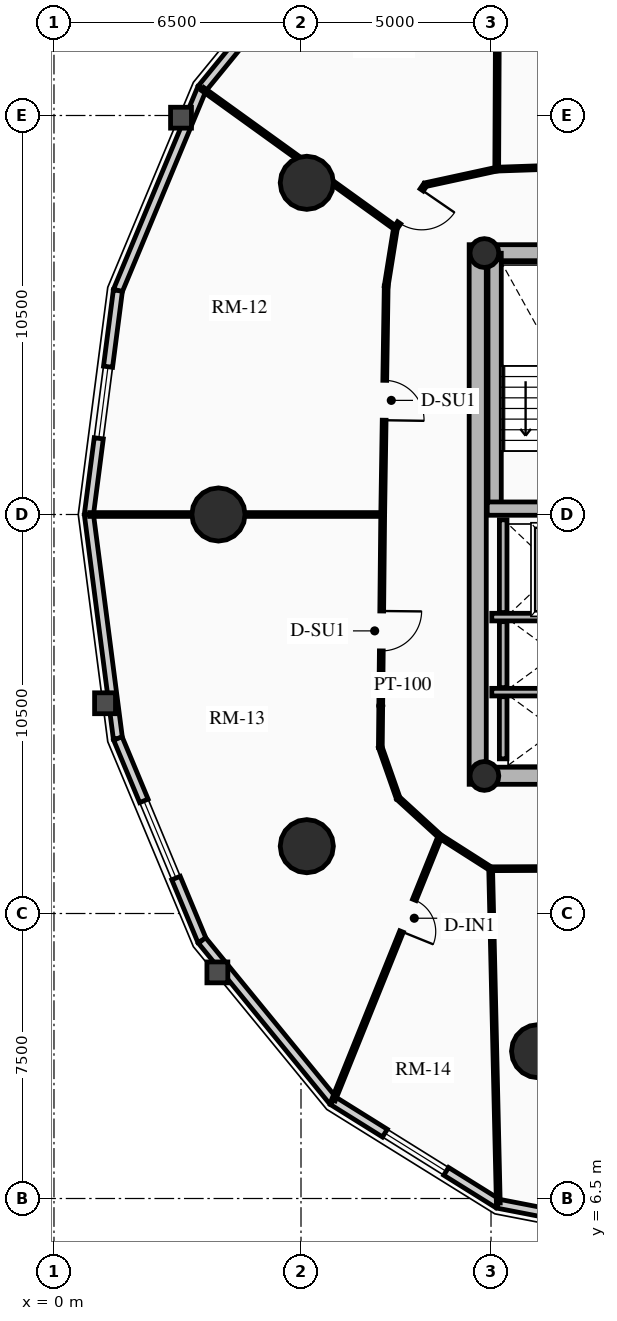
"""IFC4 building model, lengths in metres.
Left out: names, types, materials, properties, quantities, classifications, styles, units other than length and angle.
Written with IfcOpenShell. Run it as: python <this file> out.ifc"""

import sys

from ifc_helpers import new_model, si_unit, direction, frame, frame_2d, origin, origin_2d, place, context, subcontext, project, spatial, rectangle, circle, hollow_circle, extrude, source, transform, mapped, element, fill, save


model = new_model("IFC4")
c1 = context("Model", 3, precision=1e-05, world=origin(), true_north=direction((0.0, 1.0)))
c2 = subcontext(c1, "Body", "Model", "MODEL_VIEW")
j1 = project(units=[si_unit("LENGTHUNIT", "METRE"), si_unit("PLANEANGLEUNIT", "RADIAN")], contexts=[c1])
p1 = place(None, origin())
s1 = spatial("IfcSite", under=j1, at=p1, CompositionType="ELEMENT")
p2 = place(p1, origin())
s2 = spatial("IfcBuilding", under=s1, at=p2, CompositionType="ELEMENT")
p3 = place(p2, frame((0.0, 0.0, 99.25)))
s3 = spatial("IfcBuildingStorey", under=s2, at=p3, CompositionType="ELEMENT", Elevation=99.25)
p4 = place(p3, frame((11.15, 17.4, 0.0), z_axis=(0.0, 0.0, 1.0), x_axis=(0.0, 1.0, 0.0)))
e1 = element("IfcWall", 1, at=p4, inside=s3, PredefinedType="SHEAR", context=c2, shape_type="SweptSolid", body=[
    extrude(rectangle(XDim=14.2, YDim=0.45, at=frame_2d((7.1, 0.0))), origin(), (0.0, 0.0, 1.0), 2.91),
])
p5 = place(p3, frame((11.15, 17.625, 0.0), z_axis=(0.0, 0.0, 1.0), x_axis=(1.0, 0.0, 0.0)))
e2 = element("IfcWall", 2, at=p5, inside=s3, PredefinedType="SHEAR", context=c2, shape_type="SweptSolid", body=[
    extrude(rectangle(XDim=10.7, YDim=0.45, at=frame_2d((5.35, 0.0))), origin(), (0.0, 0.0, 1.0), 2.91),
])
m1 = source(origin(), c2, "Body", "SweptSolid", [
    extrude(rectangle(XDim=1.5, YDim=2.02, at=frame_2d((0.75, 1.01))), frame((0.0, 0.235, 0.0), z_axis=(0.0, -1.0, 0.0), x_axis=(1.0, 0.0, 0.0)), (0.0, 0.0, 1.0), 0.47),
])
p6 = place(p5, frame((5.45, 0.0, 0.0)))
e3 = element("IfcOpeningElement", 3, at=p6, cuts=e2, PredefinedType="OPENING", context=c2, shape_type="MappedRepresentation", body=[
    mapped(m1, transform((0.0, 0.0, 0.0), x_axis=(1.0, 0.0, 0.0), y_axis=(0.0, 1.0, 0.0), z_axis=(0.0, 0.0, 1.0), scale=1.0)),
])
p7 = place(p3, frame((11.15, 31.375, 0.0), z_axis=(0.0, 0.0, 1.0), x_axis=(1.0, 0.0, 0.0)))
e4 = element("IfcWall", 4, at=p7, inside=s3, PredefinedType="SHEAR", context=c2, shape_type="SweptSolid", body=[
    extrude(rectangle(XDim=10.7, YDim=0.45, at=frame_2d((5.35, 0.0))), origin(), (0.0, 0.0, 1.0), 2.91),
])
p8 = place(p7, frame((4.6, 0.0, 0.0)))
e5 = element("IfcOpeningElement", 5, at=p8, cuts=e4, PredefinedType="OPENING", context=c2, shape_type="MappedRepresentation", body=[
    mapped(m1, transform((0.0, 0.0, 0.0), x_axis=(1.0, 0.0, 0.0), y_axis=(0.0, 1.0, 0.0), z_axis=(0.0, 0.0, 1.0), scale=1.0)),
])
p9 = place(p3, frame((11.595, 24.655, 0.0), z_axis=(0.0, 0.0, 1.0), x_axis=(0.0, 1.0, 0.0)))
e6 = element("IfcWall", 6, at=p9, inside=s3, PredefinedType="SHEAR", context=c2, shape_type="SweptSolid", body=[
    extrude(rectangle(XDim=6.72, YDim=0.35, at=frame_2d((3.36, 0.0))), origin(), (0.0, 0.0, 1.0), 2.91),
])
p10 = place(p3, frame((11.4, 24.655, 0.0), z_axis=(0.0, 0.0, 1.0), x_axis=(1.0, 0.0, 0.0)))
e7 = element("IfcWall", 7, at=p10, inside=s3, PredefinedType="SHEAR", context=c2, shape_type="SweptSolid", body=[
    extrude(rectangle(XDim=3.285, YDim=0.35, at=frame_2d((1.643, 0.0))), origin(), (0.0, 0.0, 1.0), 2.91),
])
for number, where, z_axis, x_axis in (
    (8, (11.325, 17.62, 0.0), (0.0, 0.0, 1.0), (1.0, 0.0, 0.0)),
    (9, (11.325, 31.38, 0.0), (0.0, 0.0, 1.0), (1.0, 0.0, 0.0)),
):
    element("IfcColumn", number, at=place(p3, frame(where, z_axis=z_axis, x_axis=x_axis)), inside=s3, PredefinedType="COLUMN", context=c2, shape_type="SweptSolid", body=[
        extrude(hollow_circle(Radius=0.38, WallThickness=0.032, at=origin_2d()), origin(), (0.0, 0.0, 1.0), 2.91),
    ])
for number, where, z_axis, x_axis in (
    (10, (6.653, 33.229, 0.0), (0.0, 0.0, 1.0), (1.0, 0.0, 0.0)),
    (11, (4.328, 24.5, 0.0), (0.0, 0.0, 1.0), (1.0, 0.0, 0.0)),
    (12, (6.653, 15.771, 0.0), (0.0, 0.0, 1.0), (1.0, 0.0, 0.0)),
    (13, (12.739, 10.377, 0.0), (0.0, 0.0, 1.0), (1.0, 0.0, 0.0)),
):
    element("IfcColumn", number, at=place(p3, frame(where, z_axis=z_axis, x_axis=x_axis)), inside=s3, PredefinedType="USERDEFINED", context=c2, shape_type="SweptSolid", body=[
        extrude(circle(Radius=0.7, at=origin_2d()), origin(), (0.0, 0.0, 1.0), 2.91),
    ])
p11 = place(p3, frame((3.895, 35.709, 0.0), z_axis=(0.0, 0.0, 1.0), x_axis=(0.632700781152, 0.77439635945, 0.0)))
e14 = element("IfcWall", 14, at=p11, inside=s3, PredefinedType="SOLIDWALL", context=c2, shape_type="SweptSolid", body=[
    extrude(rectangle(XDim=5.448, YDim=0.24, at=frame_2d((2.724, 0.0))), origin(), (0.0, 0.0, 1.0), 2.179),
])
m2 = source(origin(), c2, "Body", "SweptSolid", [
    extrude(rectangle(XDim=1.9, YDim=1.35, at=frame_2d((0.95, 0.675))), frame((0.0, 0.13, 0.0), z_axis=(0.0, -1.0, 0.0), x_axis=(1.0, 0.0, 0.0)), (0.0, 0.0, 1.0), 0.26),
])
p12 = place(p11, frame((1.774, 0.0, 0.65)))
e15 = element("IfcOpeningElement", 15, at=p12, cuts=e14, PredefinedType="OPENING", context=c2, shape_type="MappedRepresentation", body=[
    mapped(m2, transform((0.0, 0.0, 0.0), x_axis=(1.0, 0.0, 0.0), y_axis=(0.0, 1.0, 0.0), z_axis=(0.0, 0.0, 1.0), scale=1.0)),
])
p13 = place(p3, frame((1.682, 30.393, 0.0), z_axis=(0.0, 0.0, 1.0), x_axis=(0.384344417632, 0.923189779317, 0.0)))
e16 = element("IfcWall", 16, at=p13, inside=s3, PredefinedType="SOLIDWALL", context=c2, shape_type="SweptSolid", body=[
    extrude(rectangle(XDim=5.758, YDim=0.24, at=frame_2d((2.879, 0.0))), origin(), (0.0, 0.0, 1.0), 2.179),
])
p14 = place(p3, frame((0.919, 24.5, 0.0), z_axis=(0.0, 0.0, 1.0), x_axis=(0.128351991996, 0.991728675672, 0.0)))
e17 = element("IfcWall", 17, at=p14, inside=s3, PredefinedType="SOLIDWALL", context=c2, shape_type="SweptSolid", body=[
    extrude(rectangle(XDim=5.942, YDim=0.24, at=frame_2d((2.971, 0.0))), origin(), (0.0, 0.0, 1.0), 2.179),
])
p15 = place(p14, frame((2.021, 0.0, 0.65)))
e18 = element("IfcOpeningElement", 18, at=p15, cuts=e17, PredefinedType="OPENING", context=c2, shape_type="MappedRepresentation", body=[
    mapped(m2, transform((0.0, 0.0, 0.0), x_axis=(1.0, 0.0, 0.0), y_axis=(0.0, 1.0, 0.0), z_axis=(0.0, 0.0, 1.0), scale=1.0)),
])
p16 = place(p3, frame((1.682, 18.607, 0.0), z_axis=(0.0, 0.0, 1.0), x_axis=(-0.128351991996, 0.991728675672, 0.0)))
e19 = element("IfcWall", 19, at=p16, inside=s3, PredefinedType="SOLIDWALL", context=c2, shape_type="SweptSolid", body=[
    extrude(rectangle(XDim=5.942, YDim=0.24, at=frame_2d((2.971, 0.0))), origin(), (0.0, 0.0, 1.0), 2.179),
])
p17 = place(p3, frame((3.895, 13.291, 0.0), z_axis=(0.0, 0.0, 1.0), x_axis=(-0.384344417632, 0.923189779317, 0.0)))
e20 = element("IfcWall", 20, at=p17, inside=s3, PredefinedType="SOLIDWALL", context=c2, shape_type="SweptSolid", body=[
    extrude(rectangle(XDim=5.758, YDim=0.24, at=frame_2d((2.879, 0.0))), origin(), (0.0, 0.0, 1.0), 2.179),
])
m3 = source(origin(), c2, "Body", "SweptSolid", [
    extrude(rectangle(XDim=2.2, YDim=1.35, at=frame_2d((1.1, 0.675))), frame((0.0, 0.13, 0.0), z_axis=(0.0, -1.0, 0.0), x_axis=(1.0, 0.0, 0.0)), (0.0, 0.0, 1.0), 0.26),
])
p18 = place(p17, frame((1.779, 0.0, 0.65)))
e21 = element("IfcOpeningElement", 21, at=p18, cuts=e20, PredefinedType="OPENING", context=c2, shape_type="MappedRepresentation", body=[
    mapped(m3, transform((0.0, 0.0, 0.0), x_axis=(1.0, 0.0, 0.0), y_axis=(0.0, 1.0, 0.0), z_axis=(0.0, 0.0, 1.0), scale=1.0)),
])
p19 = place(p3, frame((7.342, 9.072, 0.0), z_axis=(0.0, 0.0, 1.0), x_axis=(-0.632700781152, 0.77439635945, 0.0)))
e22 = element("IfcWall", 22, at=p19, inside=s3, PredefinedType="SOLIDWALL", context=c2, shape_type="SweptSolid", body=[
    extrude(rectangle(XDim=5.448, YDim=0.24, at=frame_2d((2.724, 0.0))), origin(), (0.0, 0.0, 1.0), 2.179),
])
p20 = place(p3, frame((11.685, 6.363, 0.0), z_axis=(0.0, 0.0, 1.0), x_axis=(-0.848520380187, 0.529162701263, 0.0)))
e23 = element("IfcWall", 23, at=p20, inside=s3, PredefinedType="SOLIDWALL", context=c2, shape_type="SweptSolid", body=[
    extrude(rectangle(XDim=5.119, YDim=0.24, at=frame_2d((2.56, 0.0))), origin(), (0.0, 0.0, 1.0), 2.179),
])
p21 = place(p20, frame((1.609, 0.0, 0.65)))
e24 = element("IfcOpeningElement", 24, at=p21, cuts=e23, PredefinedType="OPENING", context=c2, shape_type="MappedRepresentation", body=[
    mapped(m2, transform((0.0, 0.0, 0.0), x_axis=(1.0, 0.0, 0.0), y_axis=(0.0, 1.0, 0.0), z_axis=(0.0, 0.0, 1.0), scale=1.0)),
])
p22 = place(p3, frame((16.5, 5.43, 0.0), z_axis=(0.0, 0.0, 1.0), x_axis=(-0.981723785992, 0.190311344954, 0.0)))
e25 = element("IfcWall", 25, at=p22, inside=s3, PredefinedType="SOLIDWALL", context=c2, shape_type="SweptSolid", body=[
    extrude(rectangle(XDim=4.904, YDim=0.24, at=frame_2d((2.452, 0.0))), origin(), (0.0, 0.0, 1.0), 2.179),
])
p23 = place(p22, frame((1.352, 0.0, 0.65)))
e26 = element("IfcOpeningElement", 26, at=p23, cuts=e25, PredefinedType="OPENING", context=c2, shape_type="MappedRepresentation", body=[
    mapped(m3, transform((0.0, 0.0, 0.0), x_axis=(1.0, 0.0, 0.0), y_axis=(0.0, 1.0, 0.0), z_axis=(0.0, 0.0, 1.0), scale=1.0)),
])
p24 = place(p3, frame((11.52, 21.8, 0.0), z_axis=(0.0, 0.0, 1.0), x_axis=(1.0, 0.0, 0.0)))
e27 = element("IfcWall", 27, at=p24, inside=s3, PredefinedType="SHEAR", context=c2, shape_type="SweptSolid", body=[
    extrude(rectangle(XDim=2.97, YDim=0.2, at=frame_2d((1.485, 0.0))), origin(), (0.0, 0.0, 1.0), 2.91),
])
p25 = place(p3, frame((11.82, 21.92, 0.0), z_axis=(0.0, 0.0, 1.0), x_axis=(0.0, 1.0, 0.0)))
e28 = element("IfcWall", 28, at=p25, inside=s3, PredefinedType="SHEAR", context=c2, shape_type="SweptSolid", body=[
    extrude(rectangle(XDim=2.44, YDim=0.2, at=frame_2d((1.22, 0.0))), origin(), (0.0, 0.0, 1.0), 2.91),
])
p26 = place(p3, frame((11.52, 19.825, 0.0), z_axis=(0.0, 0.0, 1.0), x_axis=(1.0, 0.0, 0.0)))
e29 = element("IfcWall", 29, at=p26, inside=s3, PredefinedType="SHEAR", context=c2, shape_type="SweptSolid", body=[
    extrude(rectangle(XDim=2.97, YDim=0.2, at=frame_2d((1.485, 0.0))), origin(), (0.0, 0.0, 1.0), 2.91),
])
p27 = place(p3, frame((11.82, 19.945, 0.0), z_axis=(0.0, 0.0, 1.0), x_axis=(0.0, 1.0, 0.0)))
e30 = element("IfcWall", 30, at=p27, inside=s3, PredefinedType="SHEAR", context=c2, shape_type="SweptSolid", body=[
    extrude(rectangle(XDim=1.735, YDim=0.2, at=frame_2d((0.867, 0.0))), origin(), (0.0, 0.0, 1.0), 2.91),
])
p28 = place(p3, frame((11.82, 18.07, 0.0), z_axis=(0.0, 0.0, 1.0), x_axis=(0.0, 1.0, 0.0)))
e31 = element("IfcWall", 31, at=p28, inside=s3, PredefinedType="SHEAR", context=c2, shape_type="SweptSolid", body=[
    extrude(rectangle(XDim=1.635, YDim=0.2, at=frame_2d((0.817, 0.0))), origin(), (0.0, 0.0, 1.0), 2.91),
])
p29 = place(p3, frame((18.133, 33.81, 0.0), z_axis=(0.0, 0.0, 1.0), x_axis=(-0.999415793323, -0.03417706916, 0.0)))
e32 = element("IfcWall", 32, at=p29, inside=s3, PredefinedType="MOVABLE", context=c2, shape_type="SweptSolid", body=[
    extrude(rectangle(XDim=6.486, YDim=0.1, at=frame_2d((3.243, 0.0))), origin(), (0.0, 0.0, 1.0), 2.225),
])
p30 = place(p3, frame((11.65, 33.588, 0.0), z_axis=(0.0, 0.0, 1.0), x_axis=(-0.977141987047, -0.212587716366, 0.0)))
e33 = element("IfcWall", 33, at=p30, inside=s3, PredefinedType="MOVABLE", context=c2, shape_type="SweptSolid", body=[
    extrude(rectangle(XDim=1.924, YDim=0.1, at=frame_2d((0.962, 0.0))), origin(), (0.0, 0.0, 1.0), 2.225),
])
p31 = place(p3, frame((9.771, 33.179, 0.0), z_axis=(0.0, 0.0, 1.0), x_axis=(-0.56664857412, -0.823959582412, 0.0)))
e34 = element("IfcWall", 34, at=p31, inside=s3, PredefinedType="MOVABLE", context=c2, shape_type="SweptSolid", body=[
    extrude(rectangle(XDim=1.384, YDim=0.1, at=frame_2d((0.692, 0.0))), origin(), (0.0, 0.0, 1.0), 2.225),
])
m4 = source(origin(), c2, "Body", "SweptSolid", [
    extrude(rectangle(XDim=1.05, YDim=2.015, at=frame_2d((0.525, 1.007))), frame((0.0, 0.06, 0.0), z_axis=(0.0, -1.0, 0.0), x_axis=(1.0, 0.0, 0.0)), (0.0, 0.0, 1.0), 0.12),
])
p32 = place(p31, frame((0.167, 0.0, 0.0)))
e35 = element("IfcOpeningElement", 35, at=p32, cuts=e34, PredefinedType="OPENING", context=c2, shape_type="MappedRepresentation", body=[
    mapped(m4, transform((0.0, 0.0, 0.0), x_axis=(1.0, 0.0, 0.0), y_axis=(0.0, 1.0, 0.0), z_axis=(0.0, 0.0, 1.0), scale=1.0)),
])
p33 = place(p3, frame((8.986, 32.038, 0.0), z_axis=(0.0, 0.0, 1.0), x_axis=(-0.158224526738, -0.987403159372, 0.0)))
e36 = element("IfcWall", 36, at=p33, inside=s3, PredefinedType="MOVABLE", context=c2, shape_type="SweptSolid", body=[
    extrude(rectangle(XDim=1.546, YDim=0.1, at=frame_2d((0.773, 0.0))), origin(), (0.0, 0.0, 1.0), 2.225),
])
p34 = place(p3, frame((8.742, 30.512, 0.0), z_axis=(0.0, 0.0, 1.0), x_axis=(-0.015267875777, -0.999883439191, 0.0)))
e37 = element("IfcWall", 37, at=p34, inside=s3, PredefinedType="MOVABLE", context=c2, shape_type="SweptSolid", body=[
    extrude(rectangle(XDim=6.012, YDim=0.1, at=frame_2d((3.006, 0.0))), origin(), (0.0, 0.0, 1.0), 2.655),
])
p35 = place(p34, frame((2.481, 0.0, 0.0)))
e38 = element("IfcOpeningElement", 38, at=p35, cuts=e37, PredefinedType="OPENING", context=c2, shape_type="MappedRepresentation", body=[
    mapped(m4, transform((0.0, 0.0, 0.0), x_axis=(1.0, 0.0, 0.0), y_axis=(0.0, 1.0, 0.0), z_axis=(0.0, 0.0, 1.0), scale=1.0)),
])
p36 = place(p3, frame((8.65, 24.5, 0.0), z_axis=(0.0, 0.0, 1.0), x_axis=(-0.010196235655, -0.999948017038, 0.0)))
e39 = element("IfcWall", 39, at=p36, inside=s3, PredefinedType="MOVABLE", context=c2, shape_type="SweptSolid", body=[
    extrude(rectangle(XDim=6.13, YDim=0.1, at=frame_2d((3.065, 0.0))), origin(), (0.0, 0.0, 1.0), 2.225),
])
p37 = place(p36, frame((2.54, 0.0, 0.0)))
e40 = element("IfcOpeningElement", 40, at=p37, cuts=e39, PredefinedType="OPENING", context=c2, shape_type="MappedRepresentation", body=[
    mapped(m4, transform((0.0, 0.0, 0.0), x_axis=(1.0, 0.0, 0.0), y_axis=(0.0, 1.0, 0.0), z_axis=(0.0, 0.0, 1.0), scale=1.0)),
])
p38 = place(p3, frame((8.587, 18.371, 0.0), z_axis=(0.0, 0.0, 1.0), x_axis=(0.331494289155, -0.943457225452, 0.0)))
e41 = element("IfcWall", 41, at=p38, inside=s3, PredefinedType="MOVABLE", context=c2, shape_type="SweptSolid", body=[
    extrude(rectangle(XDim=1.416, YDim=0.1, at=frame_2d((0.708, 0.0))), origin(), (0.0, 0.0, 1.0), 2.225),
])
p39 = place(p3, frame((9.057, 17.034, 0.0), z_axis=(0.0, 0.0, 1.0), x_axis=(0.737874877538, -0.674937526811, 0.0)))
e42 = element("IfcWall", 42, at=p39, inside=s3, PredefinedType="MOVABLE", context=c2, shape_type="SweptSolid", body=[
    extrude(rectangle(XDim=1.49, YDim=0.1, at=frame_2d((0.745, 0.0))), origin(), (0.0, 0.0, 1.0), 2.225),
])
p40 = place(p3, frame((10.156, 16.029, 0.0), z_axis=(0.0, 0.0, 1.0), x_axis=(0.843127549493, -0.537713618282, 0.0)))
e43 = element("IfcWall", 43, at=p40, inside=s3, PredefinedType="MOVABLE", context=c2, shape_type="SweptSolid", body=[
    extrude(rectangle(XDim=1.583, YDim=0.1, at=frame_2d((0.792, 0.0))), origin(), (0.0, 0.0, 1.0), 2.225),
])
p41 = place(p3, frame((11.49, 15.178, 0.0), z_axis=(0.0, 0.0, 1.0), x_axis=(0.99999260582, 0.003845556538, 0.0)))
e44 = element("IfcWall", 44, at=p41, inside=s3, PredefinedType="MOVABLE", context=c2, shape_type="SweptSolid", body=[
    extrude(rectangle(XDim=3.301, YDim=0.1, at=frame_2d((1.651, 0.0))), origin(), (0.0, 0.0, 1.0), 2.225),
])
p42 = place(p3, frame((11.65, 33.588, 0.0), z_axis=(0.0, 0.0, 1.0), x_axis=(0.004542212376, 0.9999896841, 0.0)))
e45 = element("IfcWall", 45, at=p42, inside=s3, PredefinedType="MOVABLE", context=c2, shape_type="SweptSolid", body=[
    extrude(rectangle(XDim=9.03, YDim=0.1, at=frame_2d((4.515, 0.0))), origin(), (0.0, 0.0, 1.0), 2.179),
])
p43 = place(p3, frame((8.986, 32.038, 0.0), z_axis=(0.0, 0.0, 1.0), x_axis=(-0.811184127106, 0.584790827502, 0.0)))
e46 = element("IfcWall", 46, at=p43, inside=s3, PredefinedType="MOVABLE", context=c2, shape_type="SweptSolid", body=[
    extrude(rectangle(XDim=6.257, YDim=0.1, at=frame_2d((3.128, 0.0))), origin(), (0.0, 0.0, 1.0), 2.179),
])
p44 = place(p3, frame((8.65, 24.5, 0.0), z_axis=(0.0, 0.0, 1.0), x_axis=(-1.0, 0.0, 0.0)))
e47 = element("IfcWall", 47, at=p44, inside=s3, PredefinedType="MOVABLE", context=c2, shape_type="SweptSolid", body=[
    extrude(rectangle(XDim=7.711, YDim=0.1, at=frame_2d((3.855, 0.0))), origin(), (0.0, 0.0, 1.0), 2.179),
])
p45 = place(p3, frame((11.49, 15.178, 0.0), z_axis=(0.0, 0.0, 1.0), x_axis=(0.022838019925, -0.999739178409, 0.0)))
e48 = element("IfcWall", 48, at=p45, inside=s3, PredefinedType="MOVABLE", context=c2, shape_type="SweptSolid", body=[
    extrude(rectangle(XDim=8.798, YDim=0.1, at=frame_2d((4.399, 0.0))), origin(), (0.0, 0.0, 1.0), 2.179),
])
p46 = place(p3, frame((10.156, 16.029, 0.0), z_axis=(0.0, 0.0, 1.0), x_axis=(-0.374397256956, -0.9272684045, 0.0)))
e49 = element("IfcWall", 49, at=p46, inside=s3, PredefinedType="MOVABLE", context=c2, shape_type="SweptSolid", body=[
    extrude(rectangle(XDim=7.485, YDim=0.1, at=frame_2d((3.743, 0.0))), origin(), (0.0, 0.0, 1.0), 2.179),
])
m5 = source(origin(), c2, "Body", "SweptSolid", [
    extrude(rectangle(XDim=0.9, YDim=2.005, at=frame_2d((0.45, 1.002))), frame((0.0, 0.06, 0.0), z_axis=(0.0, -1.0, 0.0), x_axis=(1.0, 0.0, 0.0)), (0.0, 0.0, 1.0), 0.12),
])
p47 = place(p46, frame((1.8, 0.0, 0.0)))
e50 = element("IfcOpeningElement", 50, at=p47, cuts=e49, PredefinedType="OPENING", context=c2, shape_type="MappedRepresentation", body=[
    mapped(m5, transform((0.0, 0.0, 0.0), x_axis=(1.0, 0.0, 0.0), y_axis=(0.0, 1.0, 0.0), z_axis=(0.0, 0.0, 1.0), scale=1.0)),
])
m6 = source(origin(), c2, "Body", "SweptSolid", [
    extrude(rectangle(XDim=1.9, YDim=1.35, at=frame_2d((0.95, 0.675))), frame((0.0, 0.03, 0.0), z_axis=(0.0, -1.0, 0.0), x_axis=(1.0, 0.0, 0.0)), (0.0, 0.0, 1.0), 0.06),
])
p48 = place(p15, origin())
e51 = element("IfcWindow", 51, at=p48, inside=s3, PartitioningType="DOUBLE_PANEL_VERTICAL", PredefinedType="WINDOW", context=c2, shape_type="MappedRepresentation", body=[
    mapped(m6, transform((0.0, 0.0, 0.0), x_axis=(1.0, 0.0, 0.0), y_axis=(0.0, 1.0, 0.0), z_axis=(0.0, 0.0, 1.0), scale=1.0)),
])
fill(e18, e51)
m7 = source(origin(), c2, "Body", "SweptSolid", [
    extrude(rectangle(XDim=2.2, YDim=1.35, at=frame_2d((1.1, 0.675))), frame((0.0, 0.03, 0.0), z_axis=(0.0, -1.0, 0.0), x_axis=(1.0, 0.0, 0.0)), (0.0, 0.0, 1.0), 0.06),
])
p49 = place(p18, origin())
e52 = element("IfcWindow", 52, at=p49, inside=s3, PartitioningType="DOUBLE_PANEL_VERTICAL", PredefinedType="WINDOW", context=c2, shape_type="MappedRepresentation", body=[
    mapped(m7, transform((0.0, 0.0, 0.0), x_axis=(1.0, 0.0, 0.0), y_axis=(0.0, 1.0, 0.0), z_axis=(0.0, 0.0, 1.0), scale=1.0)),
])
fill(e21, e52)
p50 = place(p21, origin())
e53 = element("IfcWindow", 53, at=p50, inside=s3, PartitioningType="DOUBLE_PANEL_VERTICAL", PredefinedType="WINDOW", context=c2, shape_type="MappedRepresentation", body=[
    mapped(m6, transform((0.0, 0.0, 0.0), x_axis=(1.0, 0.0, 0.0), y_axis=(0.0, 1.0, 0.0), z_axis=(0.0, 0.0, 1.0), scale=1.0)),
])
fill(e24, e53)
m8 = source(origin(), c2, "Body", "SweptSolid", [
    extrude(rectangle(XDim=1.05, YDim=2.015, at=frame_2d((0.525, 1.007))), frame((0.0, 0.025, 0.0), z_axis=(0.0, -1.0, 0.0), x_axis=(1.0, 0.0, 0.0)), (0.0, 0.0, 1.0), 0.05),
])
p51 = place(p32, origin())
e54 = element("IfcDoor", 54, at=p51, inside=s3, OperationType="SINGLE_SWING_LEFT", PredefinedType="DOOR", context=c2, shape_type="MappedRepresentation", body=[
    mapped(m8, transform((0.0, 0.0, 0.0), x_axis=(1.0, 0.0, 0.0), y_axis=(0.0, 1.0, 0.0), z_axis=(0.0, 0.0, 1.0), scale=1.0)),
])
fill(e35, e54)
p52 = place(p35, origin())
e55 = element("IfcDoor", 55, at=p52, inside=s3, OperationType="SINGLE_SWING_RIGHT", PredefinedType="DOOR", context=c2, shape_type="MappedRepresentation", body=[
    mapped(m8, transform((0.0, 0.0, 0.0), x_axis=(1.0, 0.0, 0.0), y_axis=(0.0, 1.0, 0.0), z_axis=(0.0, 0.0, 1.0), scale=1.0)),
])
fill(e38, e55)
p53 = place(p37, origin())
e56 = element("IfcDoor", 56, at=p53, inside=s3, OperationType="SINGLE_SWING_LEFT", PredefinedType="DOOR", context=c2, shape_type="MappedRepresentation", body=[
    mapped(m8, transform((0.0, 0.0, 0.0), x_axis=(1.0, 0.0, 0.0), y_axis=(0.0, 1.0, 0.0), z_axis=(0.0, 0.0, 1.0), scale=1.0)),
])
fill(e40, e56)
m9 = source(origin(), c2, "Body", "SweptSolid", [
    extrude(rectangle(XDim=0.9, YDim=2.005, at=frame_2d((0.45, 1.002))), frame((0.0, 0.025, 0.0), z_axis=(0.0, -1.0, 0.0), x_axis=(1.0, 0.0, 0.0)), (0.0, 0.0, 1.0), 0.05),
])
p54 = place(p47, origin())
e57 = element("IfcDoor", 57, at=p54, inside=s3, OperationType="SINGLE_SWING_RIGHT", PredefinedType="DOOR", context=c2, shape_type="MappedRepresentation", body=[
    mapped(m9, transform((0.0, 0.0, 0.0), x_axis=(1.0, 0.0, 0.0), y_axis=(0.0, 1.0, 0.0), z_axis=(0.0, 0.0, 1.0), scale=1.0)),
])
fill(e50, e57)
save(model, sys.argv[1])
